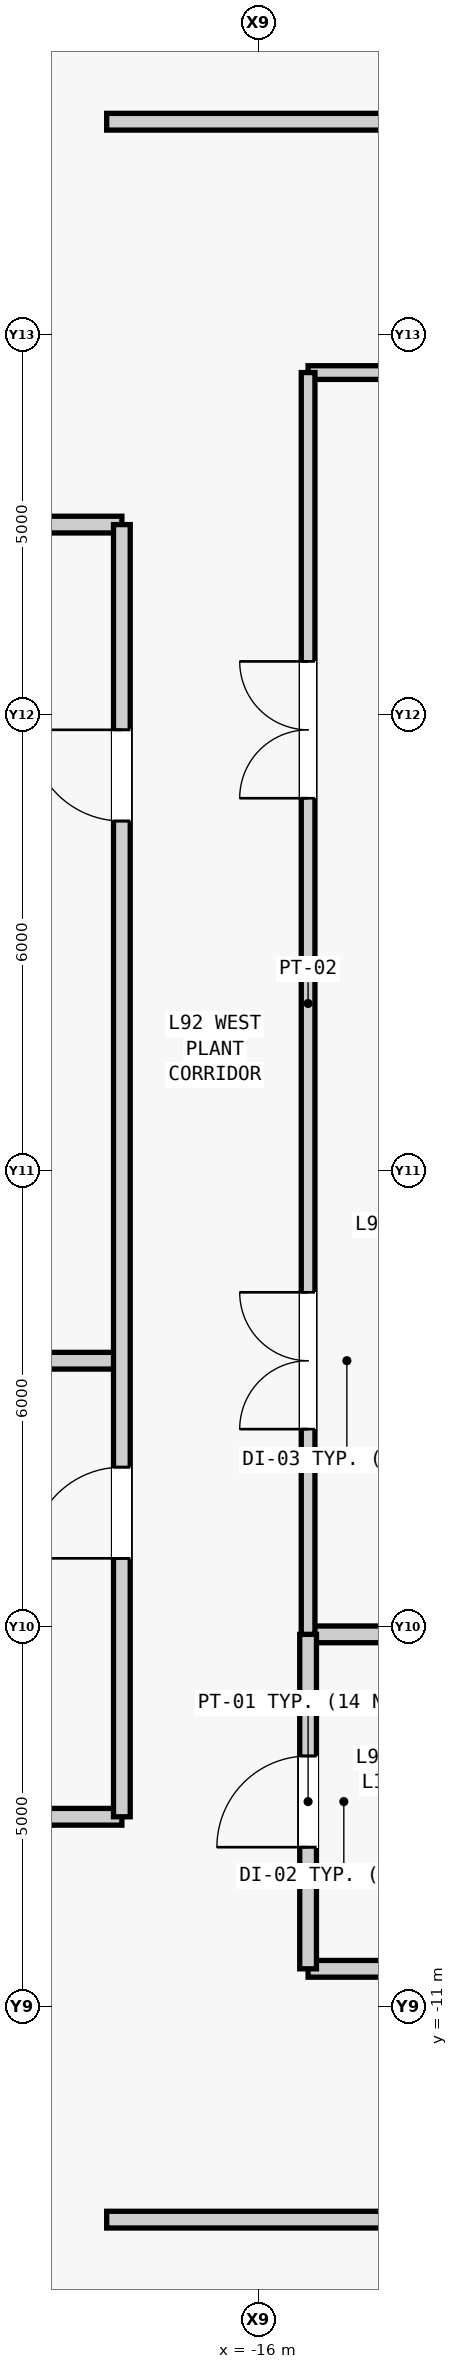
"""IFC4 building model, lengths in metres.
Left out: names, types, materials, properties, quantities, classifications, styles, units other than length and angle.
Written with IfcOpenShell. Run it as: python <this file> out.ifc"""

import sys

from ifc_helpers import new_model, si_unit, direction, frame, frame_2d, origin, place, context, subcontext, project, spatial, rectangle, extrude, source, transform, mapped, element, fill, save


model = new_model("IFC4")
c1 = context("Model", 3, precision=1e-05, world=origin(), true_north=direction((0.0, 1.0)))
c2 = subcontext(c1, "Body", "Model", "MODEL_VIEW")
j1 = project(units=[si_unit("LENGTHUNIT", "METRE"), si_unit("PLANEANGLEUNIT", "RADIAN")], contexts=[c1])
p1 = place(None, origin())
s1 = spatial("IfcSite", under=j1, at=p1, CompositionType="ELEMENT")
p2 = place(p1, origin())
s2 = spatial("IfcBuilding", under=s1, at=p2, CompositionType="ELEMENT")
p3 = place(p2, frame((0.0, 0.0, 389.9)))
s3 = spatial("IfcBuildingStorey", under=s2, at=p3, CompositionType="ELEMENT", Elevation=389.9)
m1 = source(origin(), c2, "Body", "SweptSolid", [
    extrude(rectangle(XDim=4.05, YDim=0.22, at=frame_2d((2.025, 0.0))), origin(), (0.0, 0.0, 1.0), 4.45),
])
p4 = place(p3, frame((-15.35, -10.5, 0.0), z_axis=(0.0, 0.0, 1.0), x_axis=(1.0, 0.0, 0.0)))
e1 = element("IfcWall", 1, at=p4, inside=s3, PredefinedType="PARTITIONING", context=c2, shape_type="MappedRepresentation", body=[
    mapped(m1, transform((0.0, 0.0, 0.0), scale=1.0)),
])
m2 = source(origin(), c2, "Body", "SweptSolid", [
    extrude(rectangle(XDim=4.05, YDim=0.22, at=frame_2d((2.025, 0.0))), origin(), (0.0, 0.0, 1.0), 3.901),
])
p5 = place(p3, frame((-15.35, -6.1, 0.0), z_axis=(0.0, 0.0, 1.0), x_axis=(1.0, 0.0, 0.0)))
e2 = element("IfcWall", 2, at=p5, inside=s3, PredefinedType="PARTITIONING", context=c2, shape_type="MappedRepresentation", body=[
    mapped(m2, transform((0.0, 0.0, 0.0), scale=1.0)),
])
m3 = source(origin(), c2, "Body", "SweptSolid", [
    extrude(rectangle(XDim=4.4, YDim=0.22, at=frame_2d((2.2, 0.0))), origin(), (0.0, 0.0, 1.0), 4.45),
])
p6 = place(p3, frame((-15.35, -10.5, 0.0), z_axis=(0.0, 0.0, 1.0), x_axis=(0.0, 1.0, 0.0)))
e3 = element("IfcWall", 3, at=p6, inside=s3, PredefinedType="PARTITIONING", context=c2, shape_type="MappedRepresentation", body=[
    mapped(m3, transform((0.0, 0.0, 0.0), scale=1.0)),
])
m4 = source(origin(), c2, "Body", "SweptSolid", [
    extrude(rectangle(XDim=1.2, YDim=2.2, at=frame_2d((0.6, 1.1))), frame((0.0, 0.12, 0.0), z_axis=(0.0, -1.0, 0.0), x_axis=(1.0, 0.0, 0.0)), (0.0, 0.0, 1.0), 0.24),
])
p7 = place(p6, frame((1.6, 0.0, 0.0)))
e4 = element("IfcOpeningElement", 4, at=p7, cuts=e3, PredefinedType="OPENING", context=c2, shape_type="MappedRepresentation", body=[
    mapped(m4, transform((0.0, 0.0, 0.0), scale=1.0)),
])
m5 = source(origin(), c2, "Body", "SweptSolid", [
    extrude(rectangle(XDim=4.05, YDim=0.18, at=frame_2d((2.025, 0.0))), origin(), (0.0, 0.0, 1.0), 4.45),
])
p8 = place(p3, frame((-15.35, 10.5, 0.0), z_axis=(0.0, 0.0, 1.0), x_axis=(1.0, 0.0, 0.0)))
e5 = element("IfcWall", 5, at=p8, inside=s3, PredefinedType="PARTITIONING", context=c2, shape_type="MappedRepresentation", body=[
    mapped(m5, transform((0.0, 0.0, 0.0), scale=1.0)),
])
m6 = source(origin(), c2, "Body", "SweptSolid", [
    extrude(rectangle(XDim=16.6, YDim=0.18, at=frame_2d((8.3, 0.0))), origin(), (0.0, 0.0, 1.0), 4.45),
])
p9 = place(p3, frame((-15.35, -6.1, 0.0), z_axis=(0.0, 0.0, 1.0), x_axis=(0.0, 1.0, 0.0)))
e6 = element("IfcWall", 6, at=p9, inside=s3, PredefinedType="PARTITIONING", context=c2, shape_type="MappedRepresentation", body=[
    mapped(m6, transform((0.0, 0.0, 0.0), scale=1.0)),
])
m7 = source(origin(), c2, "Body", "SweptSolid", [
    extrude(rectangle(XDim=1.8, YDim=2.25, at=frame_2d((0.9, 1.125))), frame((0.0, 0.1, 0.0), z_axis=(0.0, -1.0, 0.0), x_axis=(1.0, 0.0, 0.0)), (0.0, 0.0, 1.0), 0.2),
])
p10 = place(p9, frame((2.7, 0.0, 0.0)))
e7 = element("IfcOpeningElement", 7, at=p10, cuts=e6, PredefinedType="OPENING", context=c2, shape_type="MappedRepresentation", body=[
    mapped(m7, transform((0.0, 0.0, 0.0), scale=1.0)),
])
p11 = place(p9, frame((11.0, 0.0, 0.0)))
e8 = element("IfcOpeningElement", 8, at=p11, cuts=e6, PredefinedType="OPENING", context=c2, shape_type="MappedRepresentation", body=[
    mapped(m7, transform((0.0, 0.0, 0.0), scale=1.0)),
])
m8 = source(origin(), c2, "Body", "SweptSolid", [
    extrude(rectangle(XDim=36.0, YDim=0.22, at=frame_2d((18.0, 0.0))), origin(), (0.0, 0.0, 1.0), 4.45),
])
p12 = place(p3, frame((-18.0, -13.8, 0.0), z_axis=(0.0, 0.0, 1.0), x_axis=(1.0, 0.0, 0.0)))
e9 = element("IfcWall", 9, at=p12, inside=s3, PredefinedType="PARTITIONING", context=c2, shape_type="MappedRepresentation", body=[
    mapped(m8, transform((0.0, 0.0, 0.0), scale=1.0)),
])
m9 = source(origin(), c2, "Body", "SweptSolid", [
    extrude(rectangle(XDim=1.5, YDim=2.3, at=frame_2d((0.75, 1.15))), frame((0.0, 0.12, 0.0), z_axis=(0.0, -1.0, 0.0), x_axis=(1.0, 0.0, 0.0)), (0.0, 0.0, 1.0), 0.24),
])
p13 = place(p12, frame((12.4, 0.0, 0.0)))
e10 = element("IfcOpeningElement", 10, at=p13, cuts=e9, PredefinedType="OPENING", context=c2, shape_type="MappedRepresentation", body=[
    mapped(m9, transform((0.0, 0.0, 0.0), scale=1.0)),
])
p14 = place(p12, frame((25.4, 0.0, 0.0)))
e11 = element("IfcOpeningElement", 11, at=p14, cuts=e9, PredefinedType="OPENING", context=c2, shape_type="MappedRepresentation", body=[
    mapped(m9, transform((0.0, 0.0, 0.0), scale=1.0)),
])
p15 = place(p3, frame((-18.0, 13.8, 0.0), z_axis=(0.0, 0.0, 1.0), x_axis=(1.0, 0.0, 0.0)))
e12 = element("IfcWall", 12, at=p15, inside=s3, PredefinedType="PARTITIONING", context=c2, shape_type="MappedRepresentation", body=[
    mapped(m8, transform((0.0, 0.0, 0.0), scale=1.0)),
])
p16 = place(p15, frame((9.45, 0.0, 0.0)))
e13 = element("IfcOpeningElement", 13, at=p16, cuts=e12, PredefinedType="OPENING", context=c2, shape_type="MappedRepresentation", body=[
    mapped(m9, transform((0.0, 0.0, 0.0), scale=1.0)),
])
p17 = place(p15, frame((19.15, 0.0, 0.0)))
e14 = element("IfcOpeningElement", 14, at=p17, cuts=e12, PredefinedType="OPENING", context=c2, shape_type="MappedRepresentation", body=[
    mapped(m9, transform((0.0, 0.0, 0.0), scale=1.0)),
])
p18 = place(p15, frame((27.6, 0.0, 0.0)))
e15 = element("IfcOpeningElement", 15, at=p18, cuts=e12, PredefinedType="OPENING", context=c2, shape_type="MappedRepresentation", body=[
    mapped(m9, transform((0.0, 0.0, 0.0), scale=1.0)),
])
m10 = source(origin(), c2, "Body", "SweptSolid", [
    extrude(rectangle(XDim=6.2, YDim=0.22, at=frame_2d((3.1, 0.0))), origin(), (0.0, 0.0, 1.0), 4.45),
])
for number, where, z_axis, x_axis in (
    (16, (-24.0, -2.5, 0.0), (0.0, 0.0, 1.0), (1.0, 0.0, 0.0)),
    (17, (-24.0, -8.5, 0.0), (0.0, 0.0, 1.0), (1.0, 0.0, 0.0)),
    (18, (-24.0, 8.5, 0.0), (0.0, 0.0, 1.0), (1.0, 0.0, 0.0)),
):
    element("IfcWall", number, at=place(p3, frame(where, z_axis=z_axis, x_axis=x_axis)), inside=s3, PredefinedType="PARTITIONING", context=c2, shape_type="MappedRepresentation", body=[
        mapped(m10, transform((0.0, 0.0, 0.0), scale=1.0)),
    ])
m11 = source(origin(), c2, "Body", "SweptSolid", [
    extrude(rectangle(XDim=17.0, YDim=0.22, at=frame_2d((8.5, 0.0))), origin(), (0.0, 0.0, 1.0), 4.45),
])
p19 = place(p3, frame((-17.8, -8.5, 0.0), z_axis=(0.0, 0.0, 1.0), x_axis=(0.0, 1.0, 0.0)))
e19 = element("IfcWall", 19, at=p19, inside=s3, PredefinedType="PARTITIONING", context=c2, shape_type="MappedRepresentation", body=[
    mapped(m11, transform((0.0, 0.0, 0.0), scale=1.0)),
])
p20 = place(p19, frame((3.4, 0.0, 0.0)))
e20 = element("IfcOpeningElement", 20, at=p20, cuts=e19, PredefinedType="OPENING", context=c2, shape_type="MappedRepresentation", body=[
    mapped(m4, transform((0.0, 0.0, 0.0), scale=1.0)),
])
p21 = place(p19, frame((13.1, 0.0, 0.0)))
e21 = element("IfcOpeningElement", 21, at=p21, cuts=e19, PredefinedType="OPENING", context=c2, shape_type="MappedRepresentation", body=[
    mapped(m4, transform((0.0, 0.0, 0.0), scale=1.0)),
])
m12 = source(origin(), c2, "Body", "SweptSolid", [
    extrude(rectangle(XDim=1.2, YDim=2.2, at=frame_2d((0.6, 1.1))), frame((0.0, 0.025, 0.0), z_axis=(0.0, -1.0, 0.0), x_axis=(1.0, 0.0, 0.0)), (0.0, 0.0, 1.0), 0.05),
])
p22 = place(p7, origin())
e22 = element("IfcDoor", 22, at=p22, inside=s3, OperationType="SINGLE_SWING_LEFT", PredefinedType="DOOR", context=c2, shape_type="MappedRepresentation", body=[
    mapped(m12, transform((0.0, 0.0, 0.0), scale=1.0)),
])
fill(e4, e22)
m13 = source(origin(), c2, "Body", "SweptSolid", [
    extrude(rectangle(XDim=1.8, YDim=2.25, at=frame_2d((0.9, 1.125))), frame((0.0, 0.025, 0.0), z_axis=(0.0, -1.0, 0.0), x_axis=(1.0, 0.0, 0.0)), (0.0, 0.0, 1.0), 0.05),
])
p23 = place(p10, origin())
e23 = element("IfcDoor", 23, at=p23, inside=s3, OperationType="SINGLE_SWING_LEFT", PredefinedType="DOOR", context=c2, shape_type="MappedRepresentation", body=[
    mapped(m13, transform((0.0, 0.0, 0.0), scale=1.0)),
])
fill(e7, e23)
p24 = place(p11, origin())
e24 = element("IfcDoor", 24, at=p24, inside=s3, OperationType="SINGLE_SWING_RIGHT", PredefinedType="DOOR", context=c2, shape_type="MappedRepresentation", body=[
    mapped(m13, transform((0.0, 0.0, 0.0), scale=1.0)),
])
fill(e8, e24)
p25 = place(p20, origin())
e25 = element("IfcDoor", 25, at=p25, inside=s3, OperationType="SINGLE_SWING_LEFT", PredefinedType="DOOR", context=c2, shape_type="MappedRepresentation", body=[
    mapped(m12, transform((0.0, 0.0, 0.0), scale=1.0)),
])
fill(e20, e25)
p26 = place(p21, origin())
e26 = element("IfcDoor", 26, at=p26, inside=s3, OperationType="SINGLE_SWING_RIGHT", PredefinedType="DOOR", context=c2, shape_type="MappedRepresentation", body=[
    mapped(m12, transform((0.0, 0.0, 0.0), scale=1.0)),
])
fill(e21, e26)
save(model, sys.argv[1])
